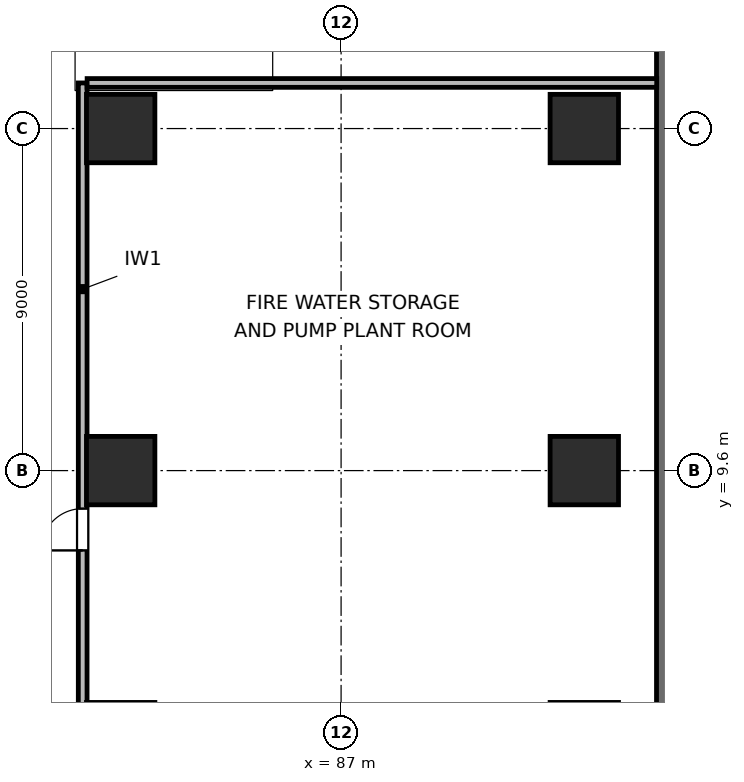
"""IFC4 building model, lengths in metres.
Left out: names, types, materials, properties, quantities, classifications, styles, units other than length and angle.
Written with IfcOpenShell. Run it as: python <this file> out.ifc"""

import sys

from ifc_helpers import new_model, si_unit, direction, frame, frame_2d, origin, origin_2d, place, context, subcontext, project, spatial, rectangle, extrude, element, fill, save


model = new_model("IFC4")
c1 = context("Model", 3, precision=1e-05, world=origin(), true_north=direction((0.0, 1.0)))
c2 = subcontext(c1, "Body", "Model", "MODEL_VIEW")
j1 = project(units=[si_unit("LENGTHUNIT", "METRE"), si_unit("PLANEANGLEUNIT", "RADIAN")], contexts=[c1])
p1 = place(None, origin())
s1 = spatial("IfcSite", under=j1, at=p1, CompositionType="ELEMENT")
p2 = place(p1, origin())
s2 = spatial("IfcBuilding", under=s1, at=p2, CompositionType="ELEMENT")
p3 = place(p2, frame((0.0, 0.0, -9.0)))
s3 = spatial("IfcBuildingStorey", under=s2, at=p3, CompositionType="ELEMENT", Elevation=-9.0)
p4 = place(p3, frame((95.65, 0.7, 0.0), z_axis=(0.0, 0.0, 1.0), x_axis=(0.0, 1.0, 0.0)))
e1 = element("IfcWall", 1, at=p4, inside=s3, PredefinedType="SOLIDWALL", context=c2, shape_type="SweptSolid", body=[
    extrude(rectangle(XDim=70.6, YDim=0.7, at=frame_2d((35.3, 0.0))), origin(), (0.0, 0.0, 1.0), 4.5),
])
for number, where, z_axis, x_axis in (
    (2, (81.2, 2.6, 0.0), (0.0, 0.0, 1.0), (1.0, 0.0, 0.0)),
    (3, (81.2, 9.6, 0.0), (0.0, 0.0, 1.0), (1.0, 0.0, 0.0)),
    (4, (81.2, 18.6, 0.0), (0.0, 0.0, 1.0), (1.0, 0.0, 0.0)),
    (5, (93.4, 2.6, 0.0), (0.0, 0.0, 1.0), (1.0, 0.0, 0.0)),
    (6, (93.4, 9.6, 0.0), (0.0, 0.0, 1.0), (1.0, 0.0, 0.0)),
    (7, (93.4, 18.6, 0.0), (0.0, 0.0, 1.0), (1.0, 0.0, 0.0)),
):
    element("IfcColumn", number, at=place(p3, frame(where, z_axis=z_axis, x_axis=x_axis)), inside=s3, PredefinedType="COLUMN", context=c2, shape_type="SweptSolid", body=[
        extrude(rectangle(XDim=1.8, YDim=1.8, at=origin_2d()), origin(), (0.0, 0.0, 1.0), 4.5),
    ])
p5 = place(p3, frame((80.2, 0.695, 0.0), z_axis=(0.0, 0.0, 1.0), x_axis=(0.0, 1.0, 0.0)))
e8 = element("IfcWall", 8, at=p5, inside=s3, PredefinedType="PARTITIONING", context=c2, shape_type="SweptSolid", body=[
    extrude(rectangle(XDim=19.105, YDim=0.23, at=frame_2d((9.552, 0.0))), origin(), (0.0, 0.0, 1.0), 4.18),
])
p6 = place(p5, frame((6.805, 0.0, 0.0)))
e9 = element("IfcOpeningElement", 9, at=p6, cuts=e8, PredefinedType="OPENING", context=c2, shape_type="SweptSolid", body=[
    extrude(rectangle(XDim=1.1, YDim=2.05, at=frame_2d((0.55, 1.025))), frame((0.0, 0.125, 0.0), z_axis=(0.0, -1.0, 0.0), x_axis=(1.0, 0.0, 0.0)), (0.0, 0.0, 1.0), 0.25),
])
p7 = place(p3, frame((80.317, 19.8, 0.0), z_axis=(0.0, 0.0, 1.0), x_axis=(1.0, 0.0, 0.0)))
e10 = element("IfcWall", 10, at=p7, inside=s3, PredefinedType="PARTITIONING", context=c2, shape_type="SweptSolid", body=[
    extrude(rectangle(XDim=14.988, YDim=0.23, at=frame_2d((7.494, 0.0))), origin(), (0.0, 0.0, 1.0), 4.18),
])
p8 = place(p6, origin())
e11 = element("IfcDoor", 11, at=p8, inside=s3, OperationType="SINGLE_SWING_LEFT", PredefinedType="DOOR", context=c2, shape_type="SweptSolid", body=[
    extrude(rectangle(XDim=1.1, YDim=2.05, at=frame_2d((0.55, 1.025))), frame((0.0, 0.025, 0.0), z_axis=(0.0, -1.0, 0.0), x_axis=(1.0, 0.0, 0.0)), (0.0, 0.0, 1.0), 0.05),
])
fill(e9, e11)
save(model, sys.argv[1])
